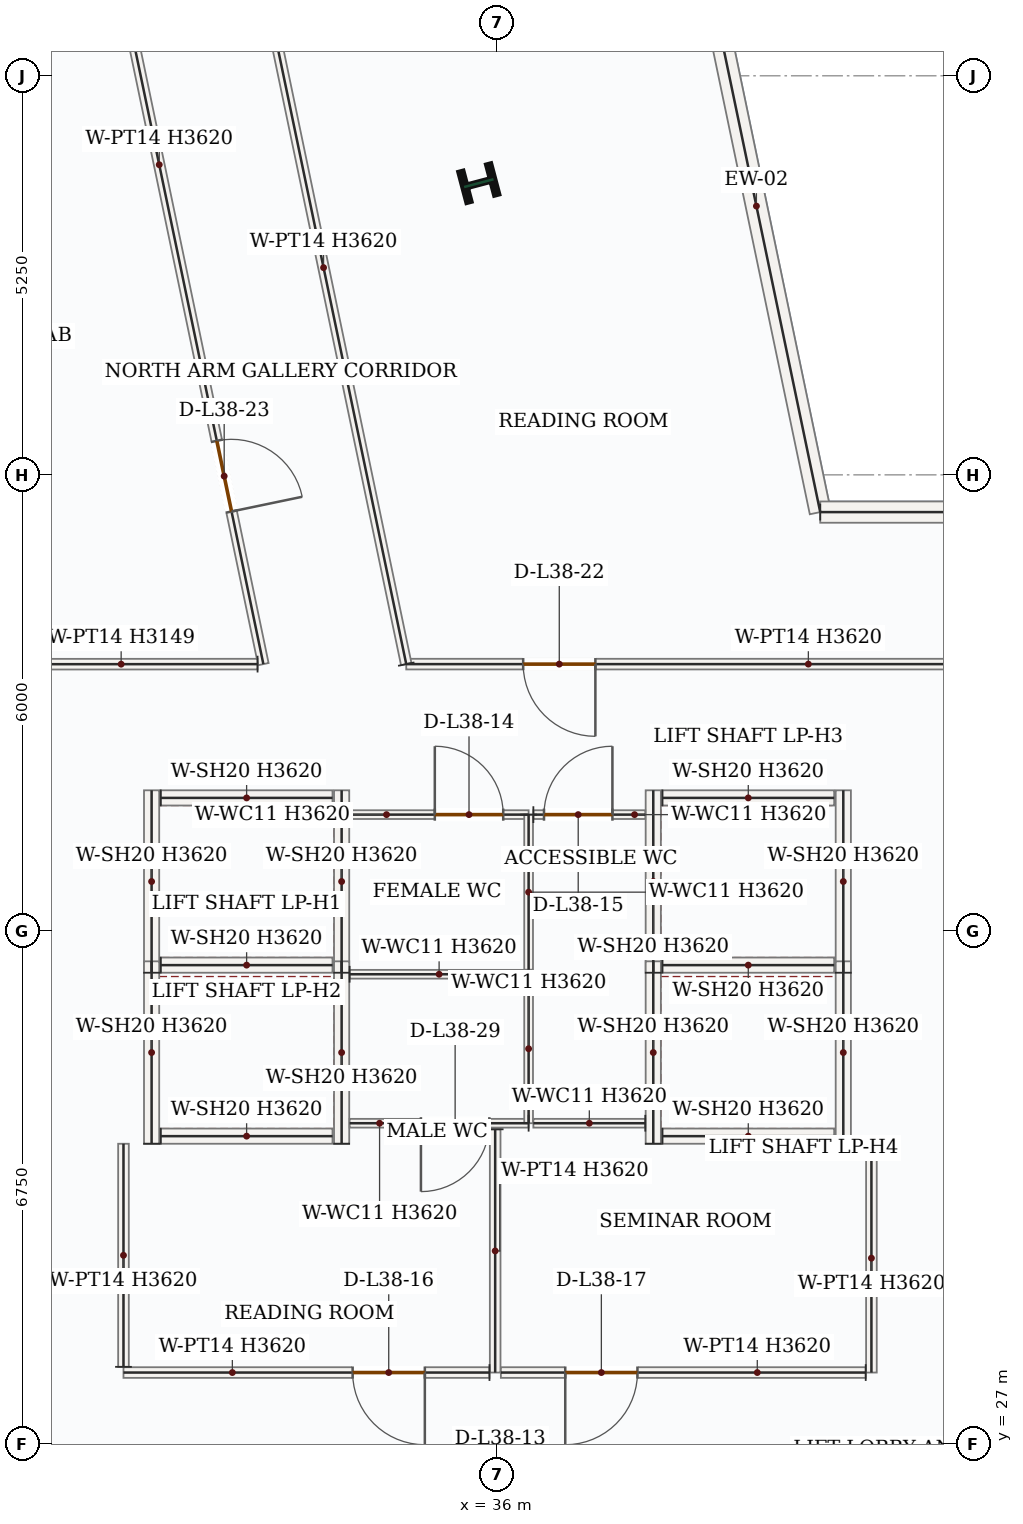
"""IFC4 building model, lengths in metres.
Left out: names, types, materials, properties, quantities, classifications, styles, units other than length and angle.
Written with IfcOpenShell. Run it as: python <this file> out.ifc"""

import sys

from ifc_helpers import new_model, si_unit, direction, frame, frame_2d, origin, origin_2d, place, context, subcontext, project, spatial, rectangle, i_section, extrude, source, transform, mapped, element, fill, save


model = new_model("IFC4")
c1 = context("Model", 3, precision=1e-05, world=origin(), true_north=direction((0.0, 1.0)))
c2 = subcontext(c1, "Body", "Model", "MODEL_VIEW")
j1 = project(units=[si_unit("LENGTHUNIT", "METRE"), si_unit("PLANEANGLEUNIT", "RADIAN")], contexts=[c1])
p1 = place(None, origin())
s1 = spatial("IfcSite", under=j1, at=p1, CompositionType="ELEMENT")
p2 = place(p1, origin())
s2 = spatial("IfcBuilding", under=s1, at=p2, CompositionType="ELEMENT")
p3 = place(p2, frame((0.0, 0.0, 166.8)))
s3 = spatial("IfcBuildingStorey", under=s2, at=p3, CompositionType="ELEMENT", Elevation=166.8)
m1 = source(origin(), c2, "Body", "SweptSolid", [
    extrude(i_section(OverallWidth=0.412, OverallDepth=0.435, WebThickness=0.036, FlangeThickness=0.057, FilletRadius=0.018, at=origin_2d()), origin(), (0.0, 0.0, 1.0), 3.9),
])
p4 = place(p3, frame((35.755, 43.588, 0.0), z_axis=(0.0, 0.0, 1.0), x_axis=(-0.255445757936, 0.966823388604, 0.0)))
e1 = element("IfcColumn", 1, at=p4, inside=s3, PredefinedType="COLUMN", context=c2, shape_type="MappedRepresentation", body=[
    mapped(m1, transform((0.0, 0.0, 0.0), x_axis=(1.0, 0.0, 0.0), y_axis=(0.0, 1.0, 0.0), z_axis=(0.0, 0.0, 1.0), scale=1.0)),
])
m2 = source(origin(), c2, "Body", "SweptSolid", [
    extrude(rectangle(XDim=8.225, YDim=0.28, at=frame_2d((4.113, 0.0))), origin(), (0.0, 0.0, 1.0), 3.62),
])
p5 = place(p3, frame((38.567, 47.312, 0.0), z_axis=(0.0, 0.0, 1.0), x_axis=(0.204152195211, -0.978939161128, 0.0)))
e2 = element("IfcWall", 2, at=p5, inside=s3, PredefinedType="SOLIDWALL", context=c2, shape_type="MappedRepresentation", body=[
    mapped(m2, transform((0.0, 0.0, 0.0), x_axis=(1.0, 0.0, 0.0), y_axis=(0.0, 1.0, 0.0), z_axis=(0.0, 0.0, 1.0), scale=1.0)),
])
m3 = source(origin(), c2, "Body", "SweptSolid", [
    extrude(rectangle(XDim=9.095, YDim=0.28, at=frame_2d((4.548, 0.0))), origin(), (0.0, 0.0, 1.0), 3.62),
])
p6 = place(p3, frame((40.247, 39.26, 0.0), z_axis=(0.0, 0.0, 1.0), x_axis=(1.0, 0.0, 0.0)))
e3 = element("IfcWall", 3, at=p6, inside=s3, PredefinedType="SOLIDWALL", context=c2, shape_type="MappedRepresentation", body=[
    mapped(m3, transform((0.0, 0.0, 0.0), x_axis=(1.0, 0.0, 0.0), y_axis=(0.0, 1.0, 0.0), z_axis=(0.0, 0.0, 1.0), scale=1.0)),
])
m4 = source(origin(), c2, "Body", "SweptSolid", [
    extrude(rectangle(XDim=2.4, YDim=0.2, at=frame_2d((1.2, 0.0))), origin(), (0.0, 0.0, 1.0), 3.62),
])
for number, where, z_axis, x_axis in (
    (4, (31.45, 33.2, 0.0), (0.0, 0.0, 1.0), (0.0, 1.0, 0.0)),
    (5, (33.95, 33.2, 0.0), (0.0, 0.0, 1.0), (0.0, 1.0, 0.0)),
):
    element("IfcWall", number, at=place(p3, frame(where, z_axis=z_axis, x_axis=x_axis)), inside=s3, PredefinedType="SOLIDWALL", context=c2, shape_type="MappedRepresentation", body=[
        mapped(m4, transform((0.0, 0.0, 0.0), x_axis=(1.0, 0.0, 0.0), y_axis=(0.0, 1.0, 0.0), z_axis=(0.0, 0.0, 1.0), scale=1.0)),
    ])
m5 = source(origin(), c2, "Body", "SweptSolid", [
    extrude(rectangle(XDim=2.26, YDim=0.2, at=frame_2d((1.13, 0.0))), origin(), (0.0, 0.0, 1.0), 3.62),
])
for number, where, z_axis, x_axis in (
    (6, (31.57, 33.3, 0.0), (0.0, 0.0, 1.0), (1.0, 0.0, 0.0)),
    (7, (31.57, 35.5, 0.0), (0.0, 0.0, 1.0), (1.0, 0.0, 0.0)),
):
    element("IfcWall", number, at=place(p3, frame(where, z_axis=z_axis, x_axis=x_axis)), inside=s3, PredefinedType="SOLIDWALL", context=c2, shape_type="MappedRepresentation", body=[
        mapped(m5, transform((0.0, 0.0, 0.0), x_axis=(1.0, 0.0, 0.0), y_axis=(0.0, 1.0, 0.0), z_axis=(0.0, 0.0, 1.0), scale=1.0)),
    ])
for number, where, z_axis, x_axis in (
    (8, (31.45, 30.95, 0.0), (0.0, 0.0, 1.0), (0.0, 1.0, 0.0)),
    (9, (33.95, 30.95, 0.0), (0.0, 0.0, 1.0), (0.0, 1.0, 0.0)),
):
    element("IfcWall", number, at=place(p3, frame(where, z_axis=z_axis, x_axis=x_axis)), inside=s3, PredefinedType="SOLIDWALL", context=c2, shape_type="MappedRepresentation", body=[
        mapped(m4, transform((0.0, 0.0, 0.0), x_axis=(1.0, 0.0, 0.0), y_axis=(0.0, 1.0, 0.0), z_axis=(0.0, 0.0, 1.0), scale=1.0)),
    ])
p7 = place(p3, frame((31.57, 31.05, 0.0), z_axis=(0.0, 0.0, 1.0), x_axis=(1.0, 0.0, 0.0)))
e10 = element("IfcWall", 10, at=p7, inside=s3, PredefinedType="SOLIDWALL", context=c2, shape_type="MappedRepresentation", body=[
    mapped(m5, transform((0.0, 0.0, 0.0), x_axis=(1.0, 0.0, 0.0), y_axis=(0.0, 1.0, 0.0), z_axis=(0.0, 0.0, 1.0), scale=1.0)),
])
for number, where, z_axis, x_axis in (
    (11, (38.05, 33.2, 0.0), (0.0, 0.0, 1.0), (0.0, 1.0, 0.0)),
    (12, (40.55, 33.2, 0.0), (0.0, 0.0, 1.0), (0.0, 1.0, 0.0)),
):
    element("IfcWall", number, at=place(p3, frame(where, z_axis=z_axis, x_axis=x_axis)), inside=s3, PredefinedType="SOLIDWALL", context=c2, shape_type="MappedRepresentation", body=[
        mapped(m4, transform((0.0, 0.0, 0.0), x_axis=(1.0, 0.0, 0.0), y_axis=(0.0, 1.0, 0.0), z_axis=(0.0, 0.0, 1.0), scale=1.0)),
    ])
for number, where, z_axis, x_axis in (
    (13, (38.17, 33.3, 0.0), (0.0, 0.0, 1.0), (1.0, 0.0, 0.0)),
    (14, (38.17, 35.5, 0.0), (0.0, 0.0, 1.0), (1.0, 0.0, 0.0)),
):
    element("IfcWall", number, at=place(p3, frame(where, z_axis=z_axis, x_axis=x_axis)), inside=s3, PredefinedType="SOLIDWALL", context=c2, shape_type="MappedRepresentation", body=[
        mapped(m5, transform((0.0, 0.0, 0.0), x_axis=(1.0, 0.0, 0.0), y_axis=(0.0, 1.0, 0.0), z_axis=(0.0, 0.0, 1.0), scale=1.0)),
    ])
for number, where, z_axis, x_axis in (
    (15, (38.05, 30.95, 0.0), (0.0, 0.0, 1.0), (0.0, 1.0, 0.0)),
    (16, (40.55, 30.95, 0.0), (0.0, 0.0, 1.0), (0.0, 1.0, 0.0)),
):
    element("IfcWall", number, at=place(p3, frame(where, z_axis=z_axis, x_axis=x_axis)), inside=s3, PredefinedType="SOLIDWALL", context=c2, shape_type="MappedRepresentation", body=[
        mapped(m4, transform((0.0, 0.0, 0.0), x_axis=(1.0, 0.0, 0.0), y_axis=(0.0, 1.0, 0.0), z_axis=(0.0, 0.0, 1.0), scale=1.0)),
    ])
p8 = place(p3, frame((38.17, 31.05, 0.0), z_axis=(0.0, 0.0, 1.0), x_axis=(1.0, 0.0, 0.0)))
e17 = element("IfcWall", 17, at=p8, inside=s3, PredefinedType="SOLIDWALL", context=c2, shape_type="MappedRepresentation", body=[
    mapped(m5, transform((0.0, 0.0, 0.0), x_axis=(1.0, 0.0, 0.0), y_axis=(0.0, 1.0, 0.0), z_axis=(0.0, 0.0, 1.0), scale=1.0)),
])
p9 = place(p3, frame((36.41, 31.22, 0.0), z_axis=(0.0, 0.0, 1.0), x_axis=(-1.0, 0.0, 0.0)))
e18 = element("IfcWall", 18, at=p9, inside=s3, PredefinedType="PARTITIONING", context=c2, shape_type="SweptSolid", body=[
    extrude(rectangle(XDim=2.355, YDim=0.115, at=frame_2d((1.177, 0.0))), origin(), (0.0, 0.0, 1.0), 3.62),
])
p10 = place(p9, frame((0.517, 0.0, 0.0)))
e19 = element("IfcOpeningElement", 19, at=p10, cuts=e18, PredefinedType="OPENING", context=c2, shape_type="SweptSolid", body=[
    extrude(rectangle(XDim=0.9, YDim=2.1, at=frame_2d((0.45, 1.05))), frame((0.0, 0.067, 0.0), z_axis=(0.0, -1.0, 0.0), x_axis=(1.0, 0.0, 0.0)), (0.0, 0.0, 1.0), 0.135),
])
m6 = source(origin(), c2, "Body", "SweptSolid", [
    extrude(rectangle(XDim=2.355, YDim=0.115, at=frame_2d((1.177, 0.0))), origin(), (0.0, 0.0, 1.0), 3.62),
])
p11 = place(p3, frame((34.055, 33.18, 0.0), z_axis=(0.0, 0.0, 1.0), x_axis=(1.0, 0.0, 0.0)))
e20 = element("IfcWall", 20, at=p11, inside=s3, PredefinedType="PARTITIONING", context=c2, shape_type="MappedRepresentation", body=[
    mapped(m6, transform((0.0, 0.0, 0.0), x_axis=(1.0, 0.0, 0.0), y_axis=(0.0, 1.0, 0.0), z_axis=(0.0, 0.0, 1.0), scale=1.0)),
])
m7 = source(origin(), c2, "Body", "SweptSolid", [
    extrude(rectangle(XDim=1.96, YDim=0.115, at=frame_2d((0.98, 0.0))), origin(), (0.0, 0.0, 1.0), 3.62),
])
p12 = place(p3, frame((36.41, 33.18, 0.0), z_axis=(0.0, 0.0, 1.0), x_axis=(0.0, -1.0, 0.0)))
e21 = element("IfcWall", 21, at=p12, inside=s3, PredefinedType="PARTITIONING", context=c2, shape_type="MappedRepresentation", body=[
    mapped(m7, transform((0.0, 0.0, 0.0), x_axis=(1.0, 0.0, 0.0), y_axis=(0.0, 1.0, 0.0), z_axis=(0.0, 0.0, 1.0), scale=1.0)),
])
p13 = place(p3, frame((34.055, 35.28, 0.0), z_axis=(0.0, 0.0, 1.0), x_axis=(1.0, 0.0, 0.0)))
e22 = element("IfcWall", 22, at=p13, inside=s3, PredefinedType="PARTITIONING", context=c2, shape_type="SweptSolid", body=[
    extrude(rectangle(XDim=2.355, YDim=0.115, at=frame_2d((1.177, 0.0))), origin(), (0.0, 0.0, 1.0), 3.62),
])
p14 = place(p13, frame((1.121, 0.0, 0.0)))
e23 = element("IfcOpeningElement", 23, at=p14, cuts=e22, PredefinedType="OPENING", context=c2, shape_type="SweptSolid", body=[
    extrude(rectangle(XDim=0.9, YDim=2.1, at=frame_2d((0.45, 1.05))), frame((0.0, 0.067, 0.0), z_axis=(0.0, -1.0, 0.0), x_axis=(1.0, 0.0, 0.0)), (0.0, 0.0, 1.0), 0.135),
])
m8 = source(origin(), c2, "Body", "SweptSolid", [
    extrude(rectangle(XDim=2.04, YDim=0.115, at=frame_2d((1.02, 0.0))), origin(), (0.0, 0.0, 1.0), 3.62),
])
p15 = place(p3, frame((36.41, 35.28, 0.0), z_axis=(0.0, 0.0, 1.0), x_axis=(0.0, -1.0, 0.0)))
e24 = element("IfcWall", 24, at=p15, inside=s3, PredefinedType="PARTITIONING", context=c2, shape_type="MappedRepresentation", body=[
    mapped(m8, transform((0.0, 0.0, 0.0), x_axis=(1.0, 0.0, 0.0), y_axis=(0.0, 1.0, 0.0), z_axis=(0.0, 0.0, 1.0), scale=1.0)),
])
m9 = source(origin(), c2, "Body", "SweptSolid", [
    extrude(rectangle(XDim=1.473, YDim=0.115, at=frame_2d((0.736, 0.0))), origin(), (0.0, 0.0, 1.0), 3.62),
])
p16 = place(p3, frame((37.945, 31.22, 0.0), z_axis=(0.0, 0.0, 1.0), x_axis=(-1.0, 0.0, 0.0)))
e25 = element("IfcWall", 25, at=p16, inside=s3, PredefinedType="PARTITIONING", context=c2, shape_type="MappedRepresentation", body=[
    mapped(m9, transform((0.0, 0.0, 0.0), x_axis=(1.0, 0.0, 0.0), y_axis=(0.0, 1.0, 0.0), z_axis=(0.0, 0.0, 1.0), scale=1.0)),
])
p17 = place(p3, frame((36.472, 35.28, 0.0), z_axis=(0.0, 0.0, 1.0), x_axis=(1.0, 0.0, 0.0)))
e26 = element("IfcWall", 26, at=p17, inside=s3, PredefinedType="PARTITIONING", context=c2, shape_type="SweptSolid", body=[
    extrude(rectangle(XDim=1.473, YDim=0.115, at=frame_2d((0.736, 0.0))), origin(), (0.0, 0.0, 1.0), 3.62),
])
p18 = place(p17, frame((0.14, 0.0, 0.0)))
e27 = element("IfcOpeningElement", 27, at=p18, cuts=e26, PredefinedType="OPENING", context=c2, shape_type="SweptSolid", body=[
    extrude(rectangle(XDim=0.9, YDim=2.1, at=frame_2d((0.45, 1.05))), frame((0.0, 0.067, 0.0), z_axis=(0.0, -1.0, 0.0), x_axis=(1.0, 0.0, 0.0)), (0.0, 0.0, 1.0), 0.135),
])
m10 = source(origin(), c2, "Body", "SweptSolid", [
    extrude(rectangle(XDim=3.2, YDim=0.14, at=frame_2d((1.6, 0.0))), origin(), (0.0, 0.0, 1.0), 3.62),
])
p19 = place(p3, frame((35.97, 31.14, 0.0), z_axis=(0.0, 0.0, 1.0), x_axis=(0.0, -1.0, 0.0)))
e28 = element("IfcWall", 28, at=p19, inside=s3, PredefinedType="PARTITIONING", context=c2, shape_type="MappedRepresentation", body=[
    mapped(m10, transform((0.0, 0.0, 0.0), x_axis=(1.0, 0.0, 0.0), y_axis=(0.0, 1.0, 0.0), z_axis=(0.0, 0.0, 1.0), scale=1.0)),
])
p20 = place(p3, frame((35.895, 27.94, 0.0), z_axis=(0.0, 0.0, 1.0), x_axis=(-1.0, 0.0, 0.0)))
e29 = element("IfcWall", 29, at=p20, inside=s3, PredefinedType="PARTITIONING", context=c2, shape_type="SweptSolid", body=[
    extrude(rectangle(XDim=4.815, YDim=0.14, at=frame_2d((2.407, 0.0))), origin(), (0.0, 0.0, 1.0), 3.62),
])
p21 = place(p20, frame((0.85, 0.0, 0.0)))
e30 = element("IfcOpeningElement", 30, at=p21, cuts=e29, PredefinedType="OPENING", context=c2, shape_type="SweptSolid", body=[
    extrude(rectangle(XDim=0.95, YDim=2.15, at=frame_2d((0.475, 1.075))), frame((0.0, 0.08, 0.0), z_axis=(0.0, -1.0, 0.0), x_axis=(1.0, 0.0, 0.0)), (0.0, 0.0, 1.0), 0.16),
])
m11 = source(origin(), c2, "Body", "SweptSolid", [
    extrude(rectangle(XDim=2.935, YDim=0.14, at=frame_2d((1.468, 0.0))), origin(), (0.0, 0.0, 1.0), 3.62),
])
p22 = place(p3, frame((31.08, 28.015, 0.0), z_axis=(0.0, 0.0, 1.0), x_axis=(0.0, 1.0, 0.0)))
e31 = element("IfcWall", 31, at=p22, inside=s3, PredefinedType="PARTITIONING", context=c2, shape_type="MappedRepresentation", body=[
    mapped(m11, transform((0.0, 0.0, 0.0), x_axis=(1.0, 0.0, 0.0), y_axis=(0.0, 1.0, 0.0), z_axis=(0.0, 0.0, 1.0), scale=1.0)),
])
m12 = source(origin(), c2, "Body", "SweptSolid", [
    extrude(rectangle(XDim=3.01, YDim=0.14, at=frame_2d((1.505, 0.0))), origin(), (0.0, 0.0, 1.0), 3.62),
])
p23 = place(p3, frame((40.92, 30.95, 0.0), z_axis=(0.0, 0.0, 1.0), x_axis=(0.0, -1.0, 0.0)))
e32 = element("IfcWall", 32, at=p23, inside=s3, PredefinedType="PARTITIONING", context=c2, shape_type="MappedRepresentation", body=[
    mapped(m12, transform((0.0, 0.0, 0.0), x_axis=(1.0, 0.0, 0.0), y_axis=(0.0, 1.0, 0.0), z_axis=(0.0, 0.0, 1.0), scale=1.0)),
])
p24 = place(p3, frame((40.845, 27.94, 0.0), z_axis=(0.0, 0.0, 1.0), x_axis=(-1.0, 0.0, 0.0)))
e33 = element("IfcWall", 33, at=p24, inside=s3, PredefinedType="PARTITIONING", context=c2, shape_type="SweptSolid", body=[
    extrude(rectangle(XDim=4.8, YDim=0.14, at=frame_2d((2.4, 0.0))), origin(), (0.0, 0.0, 1.0), 3.62),
])
p25 = place(p24, frame((3.003, 0.0, 0.0)))
e34 = element("IfcOpeningElement", 34, at=p25, cuts=e33, PredefinedType="OPENING", context=c2, shape_type="SweptSolid", body=[
    extrude(rectangle(XDim=0.95, YDim=2.15, at=frame_2d((0.475, 1.075))), frame((0.0, 0.08, 0.0), z_axis=(0.0, -1.0, 0.0), x_axis=(1.0, 0.0, 0.0)), (0.0, 0.0, 1.0), 0.16),
])
p26 = place(p3, frame((42.742, 37.26, 0.0), z_axis=(0.0, 0.0, 1.0), x_axis=(-1.0, 0.0, 0.0)))
e35 = element("IfcWall", 35, at=p26, inside=s3, PredefinedType="PARTITIONING", context=c2, shape_type="SweptSolid", body=[
    extrude(rectangle(XDim=7.942, YDim=0.14, at=frame_2d((3.971, 0.0))), origin(), (0.0, 0.0, 1.0), 3.62),
])
p27 = place(p26, frame((5.454, 0.0, 0.0)))
e36 = element("IfcOpeningElement", 36, at=p27, cuts=e35, PredefinedType="OPENING", context=c2, shape_type="SweptSolid", body=[
    extrude(rectangle(XDim=0.95, YDim=2.15, at=frame_2d((0.475, 1.075))), frame((0.0, 0.08, 0.0), z_axis=(0.0, -1.0, 0.0), x_axis=(1.0, 0.0, 0.0)), (0.0, 0.0, 1.0), 0.16),
])
m13 = source(origin(), c2, "Body", "SweptSolid", [
    extrude(rectangle(XDim=10.656, YDim=0.14, at=frame_2d((5.328, 0.0))), origin(), (0.0, 0.0, 1.0), 3.62),
])
p28 = place(p3, frame((34.8, 37.26, 0.0), z_axis=(0.0, 0.0, 1.0), x_axis=(-0.204159189901, 0.978937702399, 0.0)))
e37 = element("IfcWall", 37, at=p28, inside=s3, PredefinedType="PARTITIONING", context=c2, shape_type="MappedRepresentation", body=[
    mapped(m13, transform((0.0, 0.0, 0.0), x_axis=(1.0, 0.0, 0.0), y_axis=(0.0, 1.0, 0.0), z_axis=(0.0, 0.0, 1.0), scale=1.0)),
])
p29 = place(p3, frame((30.823, 47.316, 0.0), z_axis=(0.0, 0.0, 1.0), x_axis=(0.204130779611, -0.978943626985, 0.0)))
e38 = element("IfcWall", 38, at=p29, inside=s3, PredefinedType="PARTITIONING", context=c2, shape_type="SweptSolid", body=[
    extrude(rectangle(XDim=10.272, YDim=0.14, at=frame_2d((5.136, 0.0))), origin(), (0.0, 0.0, 1.0), 3.62),
])
p30 = place(p29, frame((7.271, 0.0, 0.0)))
e39 = element("IfcOpeningElement", 39, at=p30, cuts=e38, PredefinedType="OPENING", context=c2, shape_type="SweptSolid", body=[
    extrude(rectangle(XDim=0.95, YDim=2.15, at=frame_2d((0.475, 1.075))), frame((0.0, 0.08, 0.0), z_axis=(0.0, -1.0, 0.0), x_axis=(1.0, 0.0, 0.0)), (0.0, 0.0, 1.0), 0.16),
])
m14 = source(origin(), c2, "Body", "SweptSolid", [
    extrude(rectangle(XDim=3.589, YDim=0.14, at=frame_2d((1.794, 0.0))), origin(), (0.0, 0.0, 1.0), 3.149),
])
p31 = place(p3, frame((32.844, 37.26, 0.0), z_axis=(0.0, 0.0, 1.0), x_axis=(-0.999999942162, -0.000340112898, 0.0)))
e40 = element("IfcWall", 40, at=p31, inside=s3, PredefinedType="PARTITIONING", context=c2, shape_type="MappedRepresentation", body=[
    mapped(m14, transform((0.0, 0.0, 0.0), x_axis=(1.0, 0.0, 0.0), y_axis=(0.0, 1.0, 0.0), z_axis=(0.0, 0.0, 1.0), scale=1.0)),
])
m15 = source(origin(), c2, "Body", "SweptSolid", [
    extrude(rectangle(XDim=0.9, YDim=2.1, at=frame_2d((0.45, 1.05))), frame((0.0, 0.025, 0.0), z_axis=(0.0, -1.0, 0.0), x_axis=(1.0, 0.0, 0.0)), (0.0, 0.0, 1.0), 0.05),
])
p32 = place(p14, origin())
e41 = element("IfcDoor", 41, at=p32, inside=s3, OperationType="SINGLE_SWING_LEFT", PredefinedType="DOOR", context=c2, shape_type="MappedRepresentation", body=[
    mapped(m15, transform((0.0, 0.0, 0.0), x_axis=(1.0, 0.0, 0.0), y_axis=(0.0, 1.0, 0.0), z_axis=(0.0, 0.0, 1.0), scale=1.0)),
])
fill(e23, e41)
p33 = place(p18, origin())
e42 = element("IfcDoor", 42, at=p33, inside=s3, OperationType="SINGLE_SWING_RIGHT", PredefinedType="DOOR", context=c2, shape_type="MappedRepresentation", body=[
    mapped(m15, transform((0.0, 0.0, 0.0), x_axis=(1.0, 0.0, 0.0), y_axis=(0.0, 1.0, 0.0), z_axis=(0.0, 0.0, 1.0), scale=1.0)),
])
fill(e27, e42)
m16 = source(origin(), c2, "Body", "SweptSolid", [
    extrude(rectangle(XDim=0.95, YDim=2.15, at=frame_2d((0.475, 1.075))), frame((0.0, 0.025, 0.0), z_axis=(0.0, -1.0, 0.0), x_axis=(1.0, 0.0, 0.0)), (0.0, 0.0, 1.0), 0.05),
])
p34 = place(p21, origin())
e43 = element("IfcDoor", 43, at=p34, inside=s3, OperationType="SINGLE_SWING_LEFT", PredefinedType="DOOR", context=c2, shape_type="MappedRepresentation", body=[
    mapped(m16, transform((0.0, 0.0, 0.0), x_axis=(1.0, 0.0, 0.0), y_axis=(0.0, 1.0, 0.0), z_axis=(0.0, 0.0, 1.0), scale=1.0)),
])
fill(e30, e43)
p35 = place(p25, origin())
e44 = element("IfcDoor", 44, at=p35, inside=s3, OperationType="SINGLE_SWING_RIGHT", PredefinedType="DOOR", context=c2, shape_type="MappedRepresentation", body=[
    mapped(m16, transform((0.0, 0.0, 0.0), x_axis=(1.0, 0.0, 0.0), y_axis=(0.0, 1.0, 0.0), z_axis=(0.0, 0.0, 1.0), scale=1.0)),
])
fill(e34, e44)
p36 = place(p27, origin())
e45 = element("IfcDoor", 45, at=p36, inside=s3, OperationType="SINGLE_SWING_LEFT", PredefinedType="DOOR", context=c2, shape_type="MappedRepresentation", body=[
    mapped(m16, transform((0.0, 0.0, 0.0), x_axis=(1.0, 0.0, 0.0), y_axis=(0.0, 1.0, 0.0), z_axis=(0.0, 0.0, 1.0), scale=1.0)),
])
fill(e36, e45)
p37 = place(p30, origin())
e46 = element("IfcDoor", 46, at=p37, inside=s3, OperationType="SINGLE_SWING_RIGHT", PredefinedType="DOOR", context=c2, shape_type="MappedRepresentation", body=[
    mapped(m16, transform((0.0, 0.0, 0.0), x_axis=(1.0, 0.0, 0.0), y_axis=(0.0, 1.0, 0.0), z_axis=(0.0, 0.0, 1.0), scale=1.0)),
])
fill(e39, e46)
p38 = place(p10, origin())
e47 = element("IfcDoor", 47, at=p38, inside=s3, OperationType="SINGLE_SWING_RIGHT", PredefinedType="DOOR", context=c2, shape_type="MappedRepresentation", body=[
    mapped(m15, transform((0.0, 0.0, 0.0), x_axis=(1.0, 0.0, 0.0), y_axis=(0.0, 1.0, 0.0), z_axis=(0.0, 0.0, 1.0), scale=1.0)),
])
fill(e19, e47)
save(model, sys.argv[1])
